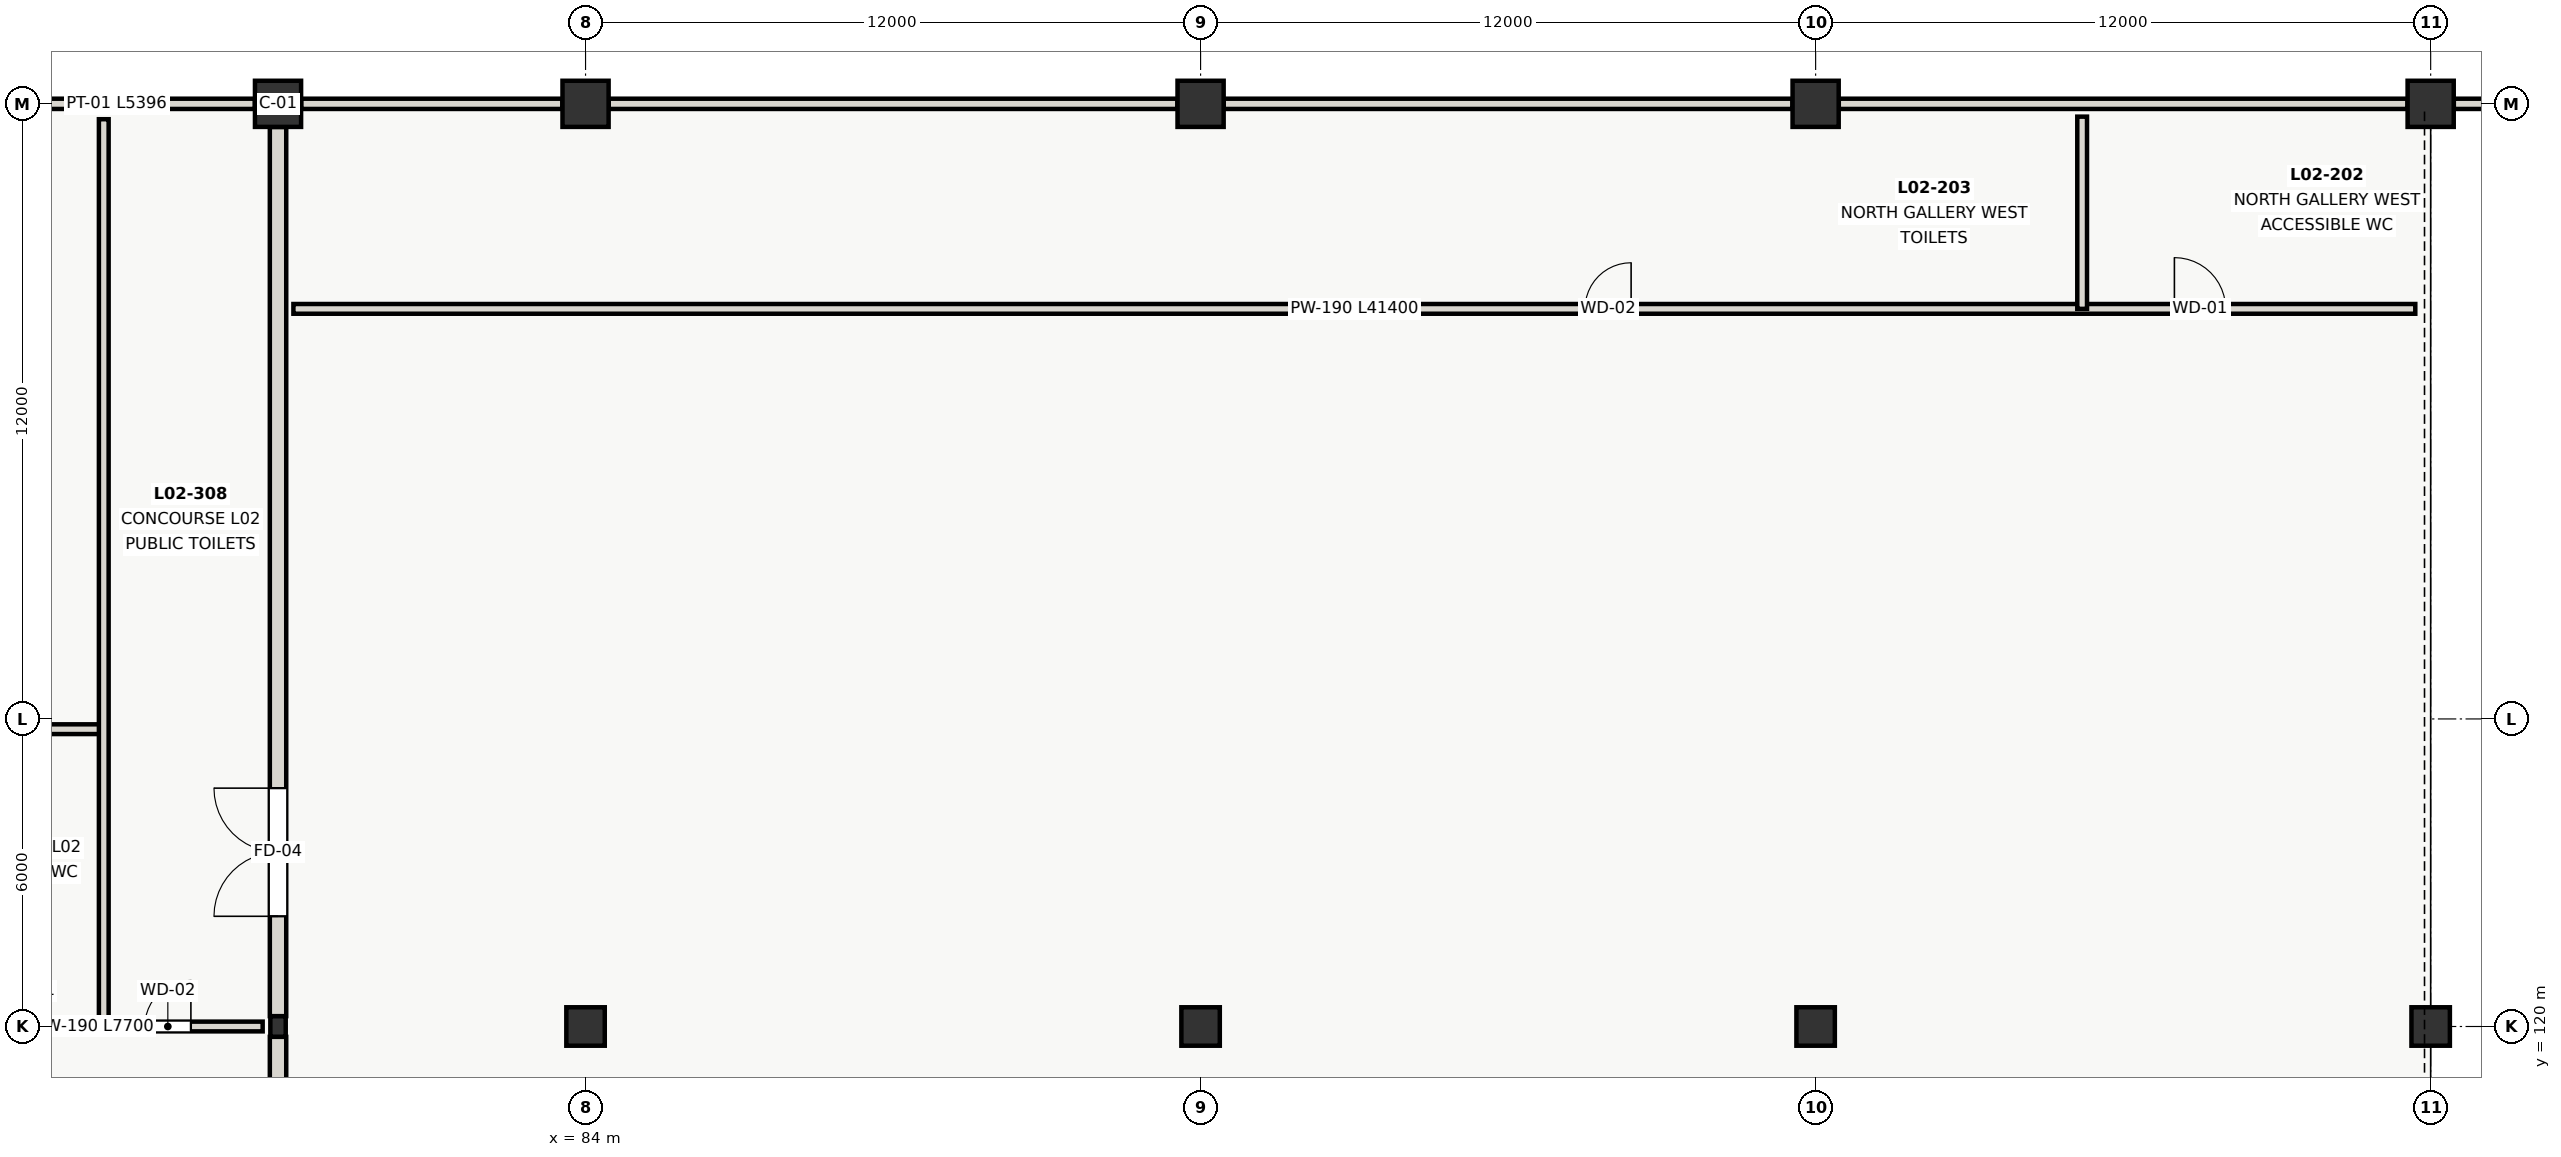
"""IFC4 building model, lengths in metres.
Left out: names, types, materials, properties, quantities, classifications, styles, units other than length and angle.
Written with IfcOpenShell. Run it as: python <this file> out.ifc"""

import sys

from ifc_helpers import new_model, si_unit, direction, frame, frame_2d, origin, origin_2d, place, context, subcontext, project, spatial, rectangle, i_section, extrude, element, fill, save


model = new_model("IFC4")
c1 = context("Model", 3, precision=1e-05, world=origin(), true_north=direction((0.0, 1.0)))
c2 = subcontext(c1, "Body", "Model", "MODEL_VIEW")
j1 = project(units=[si_unit("LENGTHUNIT", "METRE"), si_unit("PLANEANGLEUNIT", "RADIAN")], contexts=[c1])
p1 = place(None, origin())
s1 = spatial("IfcSite", under=j1, at=p1, CompositionType="ELEMENT")
p2 = place(p1, origin())
s2 = spatial("IfcBuilding", under=s1, at=p2, CompositionType="ELEMENT")
p3 = place(p2, frame((0.0, 0.0, 4.2)))
s3 = spatial("IfcBuildingStorey", under=s2, at=p3, CompositionType="ELEMENT", Elevation=4.2)
p4 = place(p3, frame((78.0, 120.0, 0.0), z_axis=(0.0, 0.0, 1.0), x_axis=(1.0, 0.0, 0.0)))
e1 = element("IfcColumn", 1, at=p4, inside=s3, PredefinedType="COLUMN", context=c2, shape_type="SweptSolid", body=[
    extrude(i_section(OverallWidth=0.3, OverallDepth=0.4, WebThickness=0.013, FlangeThickness=0.024, at=origin_2d()), origin(), (0.0, 0.0, 1.0), 4.2),
])
for number, where, z_axis, x_axis in (
    (2, (84.0, 120.0, 0.0), (0.0, 0.0, 1.0), (1.0, 0.0, 0.0)),
    (3, (96.0, 120.0, 0.0), (0.0, 0.0, 1.0), (1.0, 0.0, 0.0)),
    (4, (108.0, 120.0, 0.0), (0.0, 0.0, 1.0), (1.0, 0.0, 0.0)),
    (5, (120.0, 120.0, 0.0), (0.0, 0.0, 1.0), (1.0, 0.0, 0.0)),
):
    element("IfcColumn", number, at=place(p3, frame(where, z_axis=z_axis, x_axis=x_axis)), inside=s3, PredefinedType="COLUMN", context=c2, shape_type="SweptSolid", body=[
        extrude(rectangle(XDim=0.75, YDim=0.75, at=origin_2d()), origin(), (0.0, 0.0, 1.0), 4.2),
    ])
for number, where, z_axis, x_axis in (
    (6, (78.0, 138.0, 0.0), (0.0, 0.0, 1.0), (1.0, 0.0, 0.0)),
    (7, (84.0, 138.0, 0.0), (0.0, 0.0, 1.0), (1.0, 0.0, 0.0)),
    (8, (96.0, 138.0, 0.0), (0.0, 0.0, 1.0), (1.0, 0.0, 0.0)),
    (9, (108.0, 138.0, 0.0), (0.0, 0.0, 1.0), (1.0, 0.0, 0.0)),
    (10, (120.0, 138.0, 0.0), (0.0, 0.0, 1.0), (1.0, 0.0, 0.0)),
):
    element("IfcColumn", number, at=place(p3, frame(where, z_axis=z_axis, x_axis=x_axis)), inside=s3, PredefinedType="COLUMN", context=c2, shape_type="SweptSolid", body=[
        extrude(rectangle(XDim=0.9, YDim=0.9, at=origin_2d()), origin(), (0.0, 0.0, 1.0), 4.2),
    ])
p5 = place(p3, frame((78.0, 102.202, 0.0), z_axis=(0.0, 0.0, 1.0), x_axis=(0.0, 1.0, 0.0)))
e11 = element("IfcWall", 11, at=p5, inside=s3, PredefinedType="SHEAR", context=c2, shape_type="SweptSolid", body=[
    extrude(rectangle(XDim=17.596, YDim=0.32, at=frame_2d((8.798, 0.0))), origin(), (0.0, 0.0, 1.0), 3.8),
])
p6 = place(p5, frame((7.148, 0.0, 0.0)))
e12 = element("IfcOpeningElement", 12, at=p6, cuts=e11, PredefinedType="OPENING", context=c2, shape_type="SweptSolid", body=[
    extrude(rectangle(XDim=2.5, YDim=2.4, at=frame_2d((1.25, 1.2))), frame((0.0, 0.17, 0.0), z_axis=(0.0, -1.0, 0.0), x_axis=(1.0, 0.0, 0.0)), (0.0, 0.0, 1.0), 0.34),
])
p7 = place(p3, frame((78.0, 120.202, 0.0), z_axis=(0.0, 0.0, 1.0), x_axis=(0.0, 1.0, 0.0)))
e13 = element("IfcWall", 13, at=p7, inside=s3, PredefinedType="SHEAR", context=c2, shape_type="SweptSolid", body=[
    extrude(rectangle(XDim=17.346, YDim=0.32, at=frame_2d((8.673, 0.0))), origin(), (0.0, 0.0, 1.0), 3.8),
])
p8 = place(p7, frame((1.948, 0.0, 0.0)))
e14 = element("IfcOpeningElement", 14, at=p8, cuts=e13, PredefinedType="OPENING", context=c2, shape_type="SweptSolid", body=[
    extrude(rectangle(XDim=2.5, YDim=2.4, at=frame_2d((1.25, 1.2))), frame((0.0, 0.17, 0.0), z_axis=(0.0, -1.0, 0.0), x_axis=(1.0, 0.0, 0.0)), (0.0, 0.0, 1.0), 0.34),
])
p9 = place(p3, frame((72.152, 138.0, 0.0), z_axis=(0.0, 0.0, 1.0), x_axis=(1.0, 0.0, 0.0)))
e15 = element("IfcWall", 15, at=p9, inside=s3, PredefinedType="PARTITIONING", context=c2, shape_type="SweptSolid", body=[
    extrude(rectangle(XDim=5.396, YDim=0.2, at=frame_2d((2.698, 0.0))), origin(), (0.0, 0.0, 1.0), 3.53),
])
p10 = place(p3, frame((78.452, 138.0, 0.0), z_axis=(0.0, 0.0, 1.0), x_axis=(1.0, 0.0, 0.0)))
e16 = element("IfcWall", 16, at=p10, inside=s3, PredefinedType="PARTITIONING", context=c2, shape_type="SweptSolid", body=[
    extrude(rectangle(XDim=5.096, YDim=0.2, at=frame_2d((2.548, 0.0))), origin(), (0.0, 0.0, 1.0), 3.53),
])
for number, where, z_axis, x_axis in (
    (17, (84.452, 138.0, 0.0), (0.0, 0.0, 1.0), (1.0, 0.0, 0.0)),
    (18, (96.452, 138.0, 0.0), (0.0, 0.0, 1.0), (1.0, 0.0, 0.0)),
    (19, (108.452, 138.0, 0.0), (0.0, 0.0, 1.0), (1.0, 0.0, 0.0)),
):
    element("IfcWall", number, at=place(p3, frame(where, z_axis=z_axis, x_axis=x_axis)), inside=s3, PredefinedType="PARTITIONING", context=c2, shape_type="SweptSolid", body=[
        extrude(rectangle(XDim=11.096, YDim=0.2, at=frame_2d((5.548, 0.0))), origin(), (0.0, 0.0, 1.0), 3.53),
    ])
p11 = place(p3, frame((120.452, 138.0, 0.0), z_axis=(0.0, 0.0, 1.0), x_axis=(1.0, 0.0, 0.0)))
e20 = element("IfcWall", 20, at=p11, inside=s3, PredefinedType="PARTITIONING", context=c2, shape_type="SweptSolid", body=[
    extrude(rectangle(XDim=4.496, YDim=0.2, at=frame_2d((2.248, 0.0))), origin(), (0.0, 0.0, 1.0), 3.53),
])
p12 = place(p3, frame((78.3, 134.0, 0.0), z_axis=(0.0, 0.0, 1.0), x_axis=(1.0, 0.0, 0.0)))
e21 = element("IfcWall", 21, at=p12, inside=s3, PredefinedType="PLUMBINGWALL", context=c2, shape_type="SweptSolid", body=[
    extrude(rectangle(XDim=41.4, YDim=0.19, at=frame_2d((20.7, 0.0))), origin(), (0.0, 0.0, 1.0), 3.72),
])
p13 = place(p12, frame((25.2, 0.0, 0.0)))
e22 = element("IfcOpeningElement", 22, at=p13, cuts=e21, PredefinedType="OPENING", context=c2, shape_type="SweptSolid", body=[
    extrude(rectangle(XDim=0.9, YDim=2.05, at=frame_2d((0.45, 1.025))), frame((0.0, 0.105, 0.0), z_axis=(0.0, -1.0, 0.0), x_axis=(1.0, 0.0, 0.0)), (0.0, 0.0, 1.0), 0.21),
])
p14 = place(p12, frame((36.7, 0.0, 0.0)))
e23 = element("IfcOpeningElement", 23, at=p14, cuts=e21, PredefinedType="OPENING", context=c2, shape_type="SweptSolid", body=[
    extrude(rectangle(XDim=1.0, YDim=2.1, at=frame_2d((0.5, 1.05))), frame((0.0, 0.105, 0.0), z_axis=(0.0, -1.0, 0.0), x_axis=(1.0, 0.0, 0.0)), (0.0, 0.0, 1.0), 0.21),
])
p15 = place(p3, frame((70.0, 120.0, 0.0), z_axis=(0.0, 0.0, 1.0), x_axis=(1.0, 0.0, 0.0)))
e24 = element("IfcWall", 24, at=p15, inside=s3, PredefinedType="PLUMBINGWALL", context=c2, shape_type="SweptSolid", body=[
    extrude(rectangle(XDim=7.7, YDim=0.19, at=frame_2d((3.85, 0.0))), origin(), (0.0, 0.0, 1.0), 3.37),
])
p16 = place(p15, frame((2.6, 0.0, 0.0)))
e25 = element("IfcOpeningElement", 25, at=p16, cuts=e24, PredefinedType="OPENING", context=c2, shape_type="SweptSolid", body=[
    extrude(rectangle(XDim=1.0, YDim=2.1, at=frame_2d((0.5, 1.05))), frame((0.0, 0.105, 0.0), z_axis=(0.0, -1.0, 0.0), x_axis=(1.0, 0.0, 0.0)), (0.0, 0.0, 1.0), 0.21),
])
p17 = place(p15, frame((5.4, 0.0, 0.0)))
e26 = element("IfcOpeningElement", 26, at=p17, cuts=e24, PredefinedType="OPENING", context=c2, shape_type="SweptSolid", body=[
    extrude(rectangle(XDim=0.9, YDim=2.05, at=frame_2d((0.45, 1.025))), frame((0.0, 0.105, 0.0), z_axis=(0.0, -1.0, 0.0), x_axis=(1.0, 0.0, 0.0)), (0.0, 0.0, 1.0), 0.21),
])
p18 = place(p3, frame((113.2, 134.0, 0.0), z_axis=(0.0, 0.0, 1.0), x_axis=(0.0, 1.0, 0.0)))
e27 = element("IfcWall", 27, at=p18, inside=s3, PredefinedType="PLUMBINGWALL", context=c2, shape_type="SweptSolid", body=[
    extrude(rectangle(XDim=3.75, YDim=0.19, at=frame_2d((1.875, 0.0))), origin(), (0.0, 0.0, 1.0), 3.72),
])
p19 = place(p3, frame((70.0, 125.8, 0.0), z_axis=(0.0, 0.0, 1.0), x_axis=(1.0, 0.0, 0.0)))
e28 = element("IfcWall", 28, at=p19, inside=s3, PredefinedType="PLUMBINGWALL", context=c2, shape_type="SweptSolid", body=[
    extrude(rectangle(XDim=4.6, YDim=0.19, at=frame_2d((2.3, 0.0))), origin(), (0.0, 0.0, 1.0), 3.72),
])
p20 = place(p3, frame((74.6, 120.0, 0.0), z_axis=(0.0, 0.0, 1.0), x_axis=(0.0, 1.0, 0.0)))
e29 = element("IfcWall", 29, at=p20, inside=s3, PredefinedType="PLUMBINGWALL", context=c2, shape_type="SweptSolid", body=[
    extrude(rectangle(XDim=17.7, YDim=0.19, at=frame_2d((8.85, 0.0))), origin(), (0.0, 0.0, 1.0), 3.72),
])
p21 = place(p8, origin())
e30 = element("IfcDoor", 30, at=p21, inside=s3, OperationType="DOUBLE_DOOR_SINGLE_SWING", PredefinedType="DOOR", context=c2, shape_type="SweptSolid", body=[
    extrude(rectangle(XDim=2.5, YDim=2.4, at=frame_2d((1.25, 1.2))), frame((0.0, 0.025, 0.0), z_axis=(0.0, -1.0, 0.0), x_axis=(1.0, 0.0, 0.0)), (0.0, 0.0, 1.0), 0.05),
])
fill(e14, e30)
p22 = place(p13, origin())
e31 = element("IfcDoor", 31, at=p22, inside=s3, OperationType="SINGLE_SWING_RIGHT", PredefinedType="DOOR", context=c2, shape_type="SweptSolid", body=[
    extrude(rectangle(XDim=0.9, YDim=2.05, at=frame_2d((0.45, 1.025))), frame((0.0, 0.025, 0.0), z_axis=(0.0, -1.0, 0.0), x_axis=(1.0, 0.0, 0.0)), (0.0, 0.0, 1.0), 0.05),
])
fill(e22, e31)
p23 = place(p14, origin())
e32 = element("IfcDoor", 32, at=p23, inside=s3, OperationType="SINGLE_SWING_LEFT", PredefinedType="DOOR", context=c2, shape_type="SweptSolid", body=[
    extrude(rectangle(XDim=1.0, YDim=2.1, at=frame_2d((0.5, 1.05))), frame((0.0, 0.025, 0.0), z_axis=(0.0, -1.0, 0.0), x_axis=(1.0, 0.0, 0.0)), (0.0, 0.0, 1.0), 0.05),
])
fill(e23, e32)
p24 = place(p17, origin())
e33 = element("IfcDoor", 33, at=p24, inside=s3, OperationType="SINGLE_SWING_RIGHT", PredefinedType="DOOR", context=c2, shape_type="SweptSolid", body=[
    extrude(rectangle(XDim=0.9, YDim=2.05, at=frame_2d((0.45, 1.025))), frame((0.0, 0.025, 0.0), z_axis=(0.0, -1.0, 0.0), x_axis=(1.0, 0.0, 0.0)), (0.0, 0.0, 1.0), 0.05),
])
fill(e26, e33)
save(model, sys.argv[1])
